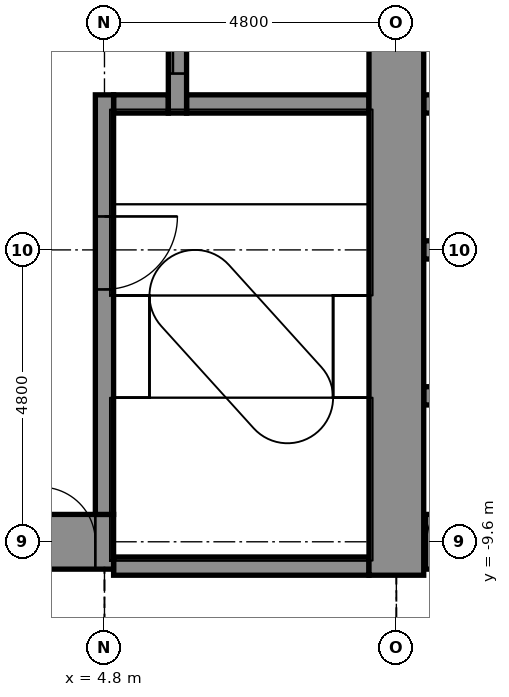
"""IFC4 building model, lengths in metres.
Left out: names, types, materials, properties, quantities, classifications, styles, units other than length and angle.
Written with IfcOpenShell. Run it as: python <this file> out.ifc"""

import sys

from ifc_helpers import new_model, si_unit, direction, frame, frame_2d, origin, place, context, subcontext, project, spatial, rectangle, extrude, element, fill, save


model = new_model("IFC4")
c1 = context("Model", 3, precision=1e-05, world=origin(), true_north=direction((0.0, 1.0)))
c2 = subcontext(c1, "Body", "Model", "MODEL_VIEW")
j1 = project(units=[si_unit("LENGTHUNIT", "METRE"), si_unit("PLANEANGLEUNIT", "RADIAN")], contexts=[c1])
p1 = place(None, origin())
s1 = spatial("IfcSite", under=j1, at=p1, CompositionType="ELEMENT")
p2 = place(p1, origin())
s2 = spatial("IfcBuilding", under=s1, at=p2, CompositionType="ELEMENT")
p3 = place(p2, frame((0.0, 0.0, 91.4)))
s3 = spatial("IfcBuildingStorey", under=s2, at=p3, CompositionType="ELEMENT", Elevation=91.4)
p4 = place(p3, frame((4.95, -10.0, -0.2), z_axis=(0.0, 0.0, 1.0), x_axis=(1.0, 0.0, 0.0)))
e1 = element("IfcWall", 1, at=p4, inside=s3, PredefinedType="STANDARD", context=c2, shape_type="SweptSolid", body=[
    extrude(rectangle(XDim=4.2, YDim=0.3, at=frame_2d((2.1, 0.0))), origin(), (0.0, 0.0, 1.0), 4.5),
])
p5 = place(p3, frame((-5.25, -9.6, -0.2), z_axis=(0.0, 0.0, 1.0), x_axis=(1.0, 0.0, 0.0)))
e2 = element("IfcWall", 2, at=p5, inside=s3, PredefinedType="SHEAR", context=c2, shape_type="SweptSolid", body=[
    extrude(rectangle(XDim=10.2, YDim=0.9, at=frame_2d((5.1, 0.0))), origin(), (0.0, 0.0, 1.0), 4.5),
])
p6 = place(p5, frame((9.0, 0.0, 0.2)))
e3 = element("IfcOpeningElement", 3, at=p6, cuts=e2, PredefinedType="OPENING", context=c2, shape_type="SweptSolid", body=[
    extrude(rectangle(XDim=0.9, YDim=2.1, at=frame_2d((0.45, 1.05))), frame((0.0, 0.46, 0.0), z_axis=(0.0, -1.0, 0.0), x_axis=(1.0, 0.0, 0.0)), (0.0, 0.0, 1.0), 0.92),
])
p7 = place(p3, frame((10.05, -9.6, -0.2), z_axis=(0.0, 0.0, 1.0), x_axis=(1.0, 0.0, 0.0)))
e4 = element("IfcWall", 4, at=p7, inside=s3, PredefinedType="SHEAR", context=c2, shape_type="SweptSolid", body=[
    extrude(rectangle(XDim=3.9, YDim=0.9, at=frame_2d((1.95, 0.0))), origin(), (0.0, 0.0, 1.0), 4.5),
])
p8 = place(p7, frame((0.05, 0.0, 0.2)))
e5 = element("IfcOpeningElement", 5, at=p8, cuts=e4, PredefinedType="OPENING", context=c2, shape_type="SweptSolid", body=[
    extrude(rectangle(XDim=0.9, YDim=2.1, at=frame_2d((0.45, 1.05))), frame((0.0, 0.46, 0.0), z_axis=(0.0, -1.0, 0.0), x_axis=(1.0, 0.0, 0.0)), (0.0, 0.0, 1.0), 0.92),
])
p9 = place(p7, frame((2.3, 0.0, 0.2)))
e6 = element("IfcOpeningElement", 6, at=p9, cuts=e4, PredefinedType="OPENING", context=c2, shape_type="SweptSolid", body=[
    extrude(rectangle(XDim=0.9, YDim=2.1, at=frame_2d((0.45, 1.05))), frame((0.0, 0.46, 0.0), z_axis=(0.0, -1.0, 0.0), x_axis=(1.0, 0.0, 0.0)), (0.0, 0.0, 1.0), 0.92),
])
for number, where, z_axis, x_axis in (
    (7, (10.05, -7.2, -0.2), (0.0, 0.0, 1.0), (1.0, 0.0, 0.0)),
    (8, (10.05, -4.8, -0.2), (0.0, 0.0, 1.0), (1.0, 0.0, 0.0)),
):
    element("IfcWall", number, at=place(p3, frame(where, z_axis=z_axis, x_axis=x_axis)), inside=s3, PredefinedType="STANDARD", context=c2, shape_type="SweptSolid", body=[
        extrude(rectangle(XDim=3.9, YDim=0.3, at=frame_2d((1.95, 0.0))), origin(), (0.0, 0.0, 1.0), 4.5),
    ])
p10 = place(p3, frame((4.95, -2.4, -0.2), z_axis=(0.0, 0.0, 1.0), x_axis=(1.0, 0.0, 0.0)))
e9 = element("IfcWall", 9, at=p10, inside=s3, PredefinedType="STANDARD", context=c2, shape_type="SweptSolid", body=[
    extrude(rectangle(XDim=0.9, YDim=0.3, at=frame_2d((0.45, 0.0))), origin(), (0.0, 0.0, 1.0), 4.5),
])
p11 = place(p3, frame((6.15, -2.4, -0.2), z_axis=(0.0, 0.0, 1.0), x_axis=(1.0, 0.0, 0.0)))
e10 = element("IfcWall", 10, at=p11, inside=s3, PredefinedType="STANDARD", context=c2, shape_type="SweptSolid", body=[
    extrude(rectangle(XDim=3.0, YDim=0.3, at=frame_2d((1.5, 0.0))), origin(), (0.0, 0.0, 1.0), 4.5),
])
p12 = place(p3, frame((10.05, -2.4, -0.2), z_axis=(0.0, 0.0, 1.0), x_axis=(1.0, 0.0, 0.0)))
e11 = element("IfcWall", 11, at=p12, inside=s3, PredefinedType="STANDARD", context=c2, shape_type="SweptSolid", body=[
    extrude(rectangle(XDim=3.9, YDim=0.3, at=frame_2d((1.95, 0.0))), origin(), (0.0, 0.0, 1.0), 4.5),
])
p13 = place(p3, frame((4.8, -9.15, -0.2), z_axis=(0.0, 0.0, 1.0), x_axis=(0.0, 1.0, 0.0)))
e12 = element("IfcWall", 12, at=p13, inside=s3, PredefinedType="STANDARD", context=c2, shape_type="SweptSolid", body=[
    extrude(rectangle(XDim=6.9, YDim=0.3, at=frame_2d((3.45, 0.0))), origin(), (0.0, 0.0, 1.0), 4.5),
])
p14 = place(p13, frame((3.7, 0.0, 0.2)))
e13 = element("IfcOpeningElement", 13, at=p14, cuts=e12, PredefinedType="OPENING", context=c2, shape_type="SweptSolid", body=[
    extrude(rectangle(XDim=1.2, YDim=2.1, at=frame_2d((0.6, 1.05))), frame((0.0, 0.16, 0.0), z_axis=(0.0, -1.0, 0.0), x_axis=(1.0, 0.0, 0.0)), (0.0, 0.0, 1.0), 0.32),
])
p15 = place(p3, frame((6.0, -2.55, -0.2), z_axis=(0.0, 0.0, 1.0), x_axis=(0.0, 1.0, 0.0)))
e14 = element("IfcWall", 14, at=p15, inside=s3, PredefinedType="STANDARD", context=c2, shape_type="SweptSolid", body=[
    extrude(rectangle(XDim=7.5, YDim=0.3, at=frame_2d((3.75, 0.0))), origin(), (0.0, 0.0, 1.0), 4.5),
])
p16 = place(p15, frame((0.65, 0.0, 0.2)))
e15 = element("IfcOpeningElement", 15, at=p16, cuts=e14, PredefinedType="OPENING", context=c2, shape_type="SweptSolid", body=[
    extrude(rectangle(XDim=1.4, YDim=2.1, at=frame_2d((0.7, 1.05))), frame((0.0, 0.16, 0.0), z_axis=(0.0, -1.0, 0.0), x_axis=(1.0, 0.0, 0.0)), (0.0, 0.0, 1.0), 0.32),
])
p17 = place(p15, frame((3.05, 0.0, 0.2)))
e16 = element("IfcOpeningElement", 16, at=p17, cuts=e14, PredefinedType="OPENING", context=c2, shape_type="SweptSolid", body=[
    extrude(rectangle(XDim=1.4, YDim=2.1, at=frame_2d((0.7, 1.05))), frame((0.0, 0.16, 0.0), z_axis=(0.0, -1.0, 0.0), x_axis=(1.0, 0.0, 0.0)), (0.0, 0.0, 1.0), 0.32),
])
p18 = place(p15, frame((5.45, 0.0, 0.2)))
e17 = element("IfcOpeningElement", 17, at=p18, cuts=e14, PredefinedType="OPENING", context=c2, shape_type="SweptSolid", body=[
    extrude(rectangle(XDim=1.4, YDim=2.1, at=frame_2d((0.7, 1.05))), frame((0.0, 0.16, 0.0), z_axis=(0.0, -1.0, 0.0), x_axis=(1.0, 0.0, 0.0)), (0.0, 0.0, 1.0), 0.32),
])
p19 = place(p3, frame((9.6, -10.15, -0.2), z_axis=(0.0, 0.0, 1.0), x_axis=(0.0, 1.0, 0.0)))
e18 = element("IfcWall", 18, at=p19, inside=s3, PredefinedType="SHEAR", context=c2, shape_type="SweptSolid", body=[
    extrude(rectangle(XDim=20.2, YDim=0.9, at=frame_2d((10.1, 0.0))), origin(), (0.0, 0.0, 1.0), 4.5),
])
p20 = place(p16, origin())
e19 = element("IfcDoor", 19, at=p20, inside=s3, OperationType="DOUBLE_DOOR_SLIDING", PredefinedType="DOOR", context=c2, shape_type="SweptSolid", body=[
    extrude(rectangle(XDim=1.4, YDim=2.1, at=frame_2d((0.7, 1.05))), frame((0.0, 0.025, 0.0), z_axis=(0.0, -1.0, 0.0), x_axis=(1.0, 0.0, 0.0)), (0.0, 0.0, 1.0), 0.05),
])
fill(e15, e19)
p21 = place(p14, frame((1.2, 0.0, 0.0), z_axis=(0.0, 0.0, 1.0), x_axis=(-1.0, 0.0, 0.0)))
e20 = element("IfcDoor", 20, at=p21, inside=s3, OperationType="SINGLE_SWING_RIGHT", PredefinedType="DOOR", context=c2, shape_type="SweptSolid", body=[
    extrude(rectangle(XDim=1.2, YDim=2.1, at=frame_2d((0.6, 1.05))), frame((0.0, 0.025, 0.0), z_axis=(0.0, -1.0, 0.0), x_axis=(1.0, 0.0, 0.0)), (0.0, 0.0, 1.0), 0.05),
])
fill(e13, e20)
p22 = place(p8, origin())
e21 = element("IfcDoor", 21, at=p22, inside=s3, OperationType="SINGLE_SWING_RIGHT", PredefinedType="DOOR", context=c2, shape_type="SweptSolid", body=[
    extrude(rectangle(XDim=0.9, YDim=2.1, at=frame_2d((0.45, 1.05))), frame((0.0, 0.025, 0.0), z_axis=(0.0, -1.0, 0.0), x_axis=(1.0, 0.0, 0.0)), (0.0, 0.0, 1.0), 0.05),
])
fill(e5, e21)
p23 = place(p6, origin())
e22 = element("IfcDoor", 22, at=p23, inside=s3, OperationType="SINGLE_SWING_LEFT", PredefinedType="DOOR", context=c2, shape_type="SweptSolid", body=[
    extrude(rectangle(XDim=0.9, YDim=2.1, at=frame_2d((0.45, 1.05))), frame((0.0, 0.025, 0.0), z_axis=(0.0, -1.0, 0.0), x_axis=(1.0, 0.0, 0.0)), (0.0, 0.0, 1.0), 0.05),
])
fill(e3, e22)
save(model, sys.argv[1])
